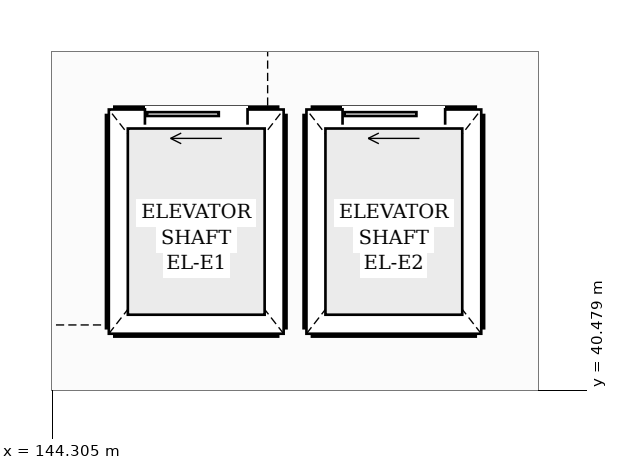
"""IFC4 building model, lengths in metres.
Left out: names, types, materials, properties, quantities, classifications, styles, units other than length and angle.
Written with IfcOpenShell. Run it as: python <this file> out.ifc"""

import sys

from ifc_helpers import new_model, si_unit, direction, frame, frame_2d, origin, place, context, subcontext, project, spatial, rectangle, extrude, element, fill, save


model = new_model("IFC4")
c1 = context("Model", 3, precision=1e-05, world=origin(), true_north=direction((0.0, 1.0)))
c2 = subcontext(c1, "Body", "Model", "MODEL_VIEW")
j1 = project(units=[si_unit("LENGTHUNIT", "METRE"), si_unit("PLANEANGLEUNIT", "RADIAN")], contexts=[c1])
p1 = place(None, origin())
s1 = spatial("IfcSite", under=j1, at=p1, CompositionType="ELEMENT")
p2 = place(p1, origin())
s2 = spatial("IfcBuilding", under=s1, at=p2, CompositionType="ELEMENT")
p3 = place(p2, origin())
s3 = spatial("IfcBuildingStorey", under=s2, at=p3, CompositionType="ELEMENT", Elevation=0.0)
p4 = place(p3, frame((145.14, 44.085, 0.0), z_axis=(0.0, 0.0, 1.0), x_axis=(1.0, 0.0, 0.0)))
e1 = element("IfcWall", 1, at=p4, inside=s3, PredefinedType="SHEAR", context=c2, shape_type="SweptSolid", body=[
    extrude(rectangle(XDim=2.12, YDim=0.22, at=frame_2d((1.06, 0.0))), origin(), (0.0, 0.0, 1.0), 5.15),
])
p5 = place(p4, frame((0.385, 0.0, 0.0)))
e2 = element("IfcOpeningElement", 2, at=p5, cuts=e1, PredefinedType="OPENING", context=c2, shape_type="SweptSolid", body=[
    extrude(rectangle(XDim=1.35, YDim=2.3, at=frame_2d((0.675, 1.15))), frame((0.0, 0.12, 0.0), z_axis=(0.0, -1.0, 0.0), x_axis=(1.0, 0.0, 0.0)), (0.0, 0.0, 1.0), 0.24),
])
p6 = place(p3, frame((145.14, 41.315, 0.0), z_axis=(0.0, 0.0, 1.0), x_axis=(1.0, 0.0, 0.0)))
e3 = element("IfcWall", 3, at=p6, inside=s3, PredefinedType="SHEAR", context=c2, shape_type="SweptSolid", body=[
    extrude(rectangle(XDim=2.12, YDim=0.22, at=frame_2d((1.06, 0.0))), origin(), (0.0, 0.0, 1.0), 5.15),
])
for number, where, z_axis, x_axis in (
    (4, (147.26, 41.315, 0.0), (0.0, 0.0, 1.0), (0.0, 1.0, 0.0)),
    (5, (145.14, 41.315, 0.0), (0.0, 0.0, 1.0), (0.0, 1.0, 0.0)),
):
    element("IfcWall", number, at=place(p3, frame(where, z_axis=z_axis, x_axis=x_axis)), inside=s3, PredefinedType="SHEAR", context=c2, shape_type="SweptSolid", body=[
        extrude(rectangle(XDim=2.77, YDim=0.22, at=frame_2d((1.385, 0.0))), origin(), (0.0, 0.0, 1.0), 5.15),
    ])
p7 = place(p3, frame((147.74, 44.085, 0.0), z_axis=(0.0, 0.0, 1.0), x_axis=(1.0, 0.0, 0.0)))
e6 = element("IfcWall", 6, at=p7, inside=s3, PredefinedType="SHEAR", context=c2, shape_type="SweptSolid", body=[
    extrude(rectangle(XDim=2.12, YDim=0.22, at=frame_2d((1.06, 0.0))), origin(), (0.0, 0.0, 1.0), 5.15),
])
p8 = place(p7, frame((0.385, 0.0, 0.0)))
e7 = element("IfcOpeningElement", 7, at=p8, cuts=e6, PredefinedType="OPENING", context=c2, shape_type="SweptSolid", body=[
    extrude(rectangle(XDim=1.35, YDim=2.3, at=frame_2d((0.675, 1.15))), frame((0.0, 0.12, 0.0), z_axis=(0.0, -1.0, 0.0), x_axis=(1.0, 0.0, 0.0)), (0.0, 0.0, 1.0), 0.24),
])
p9 = place(p3, frame((147.74, 41.315, 0.0), z_axis=(0.0, 0.0, 1.0), x_axis=(1.0, 0.0, 0.0)))
e8 = element("IfcWall", 8, at=p9, inside=s3, PredefinedType="SHEAR", context=c2, shape_type="SweptSolid", body=[
    extrude(rectangle(XDim=2.12, YDim=0.22, at=frame_2d((1.06, 0.0))), origin(), (0.0, 0.0, 1.0), 5.15),
])
for number, where, z_axis, x_axis in (
    (9, (149.86, 41.315, 0.0), (0.0, 0.0, 1.0), (0.0, 1.0, 0.0)),
    (10, (147.74, 41.315, 0.0), (0.0, 0.0, 1.0), (0.0, 1.0, 0.0)),
):
    element("IfcWall", number, at=place(p3, frame(where, z_axis=z_axis, x_axis=x_axis)), inside=s3, PredefinedType="SHEAR", context=c2, shape_type="SweptSolid", body=[
        extrude(rectangle(XDim=2.77, YDim=0.22, at=frame_2d((1.385, 0.0))), origin(), (0.0, 0.0, 1.0), 5.15),
    ])
p10 = place(p5, origin())
e11 = element("IfcDoor", 11, at=p10, inside=s3, OperationType="SLIDING_TO_LEFT", PredefinedType="DOOR", context=c2, shape_type="SweptSolid", body=[
    extrude(rectangle(XDim=1.35, YDim=2.3, at=frame_2d((0.675, 1.15))), frame((0.0, 0.025, 0.0), z_axis=(0.0, -1.0, 0.0), x_axis=(1.0, 0.0, 0.0)), (0.0, 0.0, 1.0), 0.05),
])
fill(e2, e11)
p11 = place(p8, origin())
e12 = element("IfcDoor", 12, at=p11, inside=s3, OperationType="SLIDING_TO_LEFT", PredefinedType="DOOR", context=c2, shape_type="SweptSolid", body=[
    extrude(rectangle(XDim=1.35, YDim=2.3, at=frame_2d((0.675, 1.15))), frame((0.0, 0.025, 0.0), z_axis=(0.0, -1.0, 0.0), x_axis=(1.0, 0.0, 0.0)), (0.0, 0.0, 1.0), 0.05),
])
fill(e7, e12)
save(model, sys.argv[1])
